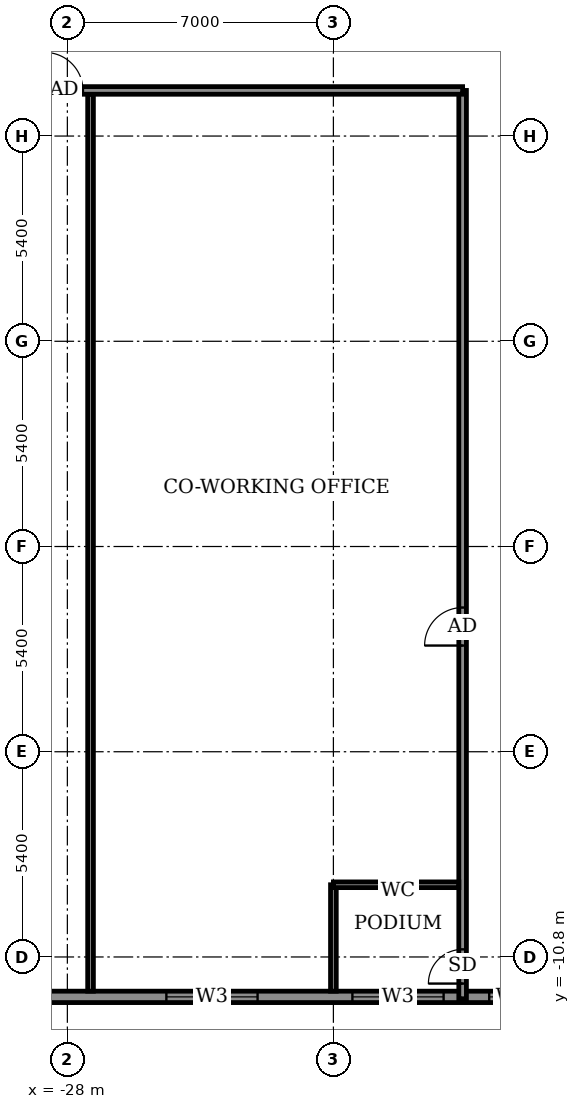
"""IFC4 building model, lengths in metres.
Left out: names, types, materials, properties, quantities, classifications, styles, units other than length and angle.
Written with IfcOpenShell. Run it as: python <this file> out.ifc"""

import sys

from ifc_helpers import new_model, si_unit, direction, frame, frame_2d, origin, place, context, subcontext, project, spatial, rectangle, extrude, element, fill, save


model = new_model("IFC4")
c1 = context("Model", 3, precision=1e-05, world=origin(), true_north=direction((0.0, 1.0)))
c2 = subcontext(c1, "Body", "Model", "MODEL_VIEW")
j1 = project(units=[si_unit("LENGTHUNIT", "METRE"), si_unit("PLANEANGLEUNIT", "RADIAN")], contexts=[c1])
p1 = place(None, origin())
s1 = spatial("IfcSite", under=j1, at=p1, CompositionType="ELEMENT")
p2 = place(p1, origin())
s2 = spatial("IfcBuilding", under=s1, at=p2, CompositionType="ELEMENT")
p3 = place(p2, frame((0.0, 0.0, 6.0)))
s3 = spatial("IfcBuildingStorey", under=s2, at=p3, CompositionType="ELEMENT", Elevation=6.0)
p4 = place(p3, frame((-32.0, -11.85, 0.0), z_axis=(0.0, 0.0, 1.0), x_axis=(1.0, 0.0, 0.0)))
e1 = element("IfcWall", 1, at=p4, inside=s3, PredefinedType="SOLIDWALL", context=c2, shape_type="SweptSolid", body=[
    extrude(rectangle(XDim=17.0, YDim=0.3, at=frame_2d((8.5, 0.0))), origin(), (0.0, 0.0, 1.0), 4.45),
])
p5 = place(p4, frame((1.149, 0.0, 0.9)))
e2 = element("IfcOpeningElement", 2, at=p5, cuts=e1, PredefinedType="OPENING", context=c2, shape_type="SweptSolid", body=[
    extrude(rectangle(XDim=2.4, YDim=1.8, at=frame_2d((1.2, 0.9))), frame((0.0, 0.16, 0.0), z_axis=(0.0, -1.0, 0.0), x_axis=(1.0, 0.0, 0.0)), (0.0, 0.0, 1.0), 0.32),
])
p6 = place(p4, frame((6.605, 0.0, 0.9)))
e3 = element("IfcOpeningElement", 3, at=p6, cuts=e1, PredefinedType="OPENING", context=c2, shape_type="SweptSolid", body=[
    extrude(rectangle(XDim=2.4, YDim=1.8, at=frame_2d((1.2, 0.9))), frame((0.0, 0.16, 0.0), z_axis=(0.0, -1.0, 0.0), x_axis=(1.0, 0.0, 0.0)), (0.0, 0.0, 1.0), 0.32),
])
p7 = place(p4, frame((11.5, 0.0, 0.9)))
e4 = element("IfcOpeningElement", 4, at=p7, cuts=e1, PredefinedType="OPENING", context=c2, shape_type="SweptSolid", body=[
    extrude(rectangle(XDim=2.4, YDim=1.8, at=frame_2d((1.2, 0.9))), frame((0.0, 0.16, 0.0), z_axis=(0.0, -1.0, 0.0), x_axis=(1.0, 0.0, 0.0)), (0.0, 0.0, 1.0), 0.32),
])
p8 = place(p4, frame((15.1, 0.0, 0.9)))
e5 = element("IfcOpeningElement", 5, at=p8, cuts=e1, PredefinedType="OPENING", context=c2, shape_type="SweptSolid", body=[
    extrude(rectangle(XDim=1.2, YDim=1.5, at=frame_2d((0.6, 0.75))), frame((0.0, 0.16, 0.0), z_axis=(0.0, -1.0, 0.0), x_axis=(1.0, 0.0, 0.0)), (0.0, 0.0, 1.0), 0.32),
])
p9 = place(p3, frame((-27.39, -11.7, 0.0), z_axis=(0.0, 0.0, 1.0), x_axis=(0.0, 1.0, 0.0)))
e6 = element("IfcWall", 6, at=p9, inside=s3, PredefinedType="PARTITIONING", context=c2, shape_type="SweptSolid", body=[
    extrude(rectangle(XDim=23.6, YDim=0.15, at=frame_2d((11.8, 0.0))), origin(), (0.0, 0.0, 1.0), 4.45),
])
p10 = place(p3, frame((-21.0, -11.7, 0.0), z_axis=(0.0, 0.0, 1.0), x_axis=(0.0, 1.0, 0.0)))
e7 = element("IfcWall", 7, at=p10, inside=s3, PredefinedType="PARTITIONING", context=c2, shape_type="SweptSolid", body=[
    extrude(rectangle(XDim=2.8, YDim=0.15, at=frame_2d((1.4, 0.0))), origin(), (0.0, 0.0, 1.0), 4.45),
])
p11 = place(p3, frame((-17.6, -11.9, 0.0), z_axis=(0.0, 0.0, 1.0), x_axis=(0.0, 1.0, 0.0)))
e8 = element("IfcWall", 8, at=p11, inside=s3, PredefinedType="PARTITIONING", context=c2, shape_type="SweptSolid", body=[
    extrude(rectangle(XDim=23.9, YDim=0.2, at=frame_2d((11.95, 0.0))), origin(), (0.0, 0.0, 1.0), 4.45),
])
p12 = place(p11, frame((9.294, 0.0, 0.0)))
e9 = element("IfcOpeningElement", 9, at=p12, cuts=e8, PredefinedType="OPENING", context=c2, shape_type="SweptSolid", body=[
    extrude(rectangle(XDim=1.0, YDim=2.1, at=frame_2d((0.5, 1.05))), frame((0.0, 0.11, 0.0), z_axis=(0.0, -1.0, 0.0), x_axis=(1.0, 0.0, 0.0)), (0.0, 0.0, 1.0), 0.22),
])
p13 = place(p11, frame((0.4, 0.0, 0.0)))
e10 = element("IfcOpeningElement", 10, at=p13, cuts=e8, PredefinedType="OPENING", context=c2, shape_type="SweptSolid", body=[
    extrude(rectangle(XDim=0.9, YDim=2.1, at=frame_2d((0.45, 1.05))), frame((0.0, 0.11, 0.0), z_axis=(0.0, -1.0, 0.0), x_axis=(1.0, 0.0, 0.0)), (0.0, 0.0, 1.0), 0.22),
])
p14 = place(p3, frame((-21.0, -8.9, 0.0), z_axis=(0.0, 0.0, 1.0), x_axis=(1.0, 0.0, 0.0)))
e11 = element("IfcWall", 11, at=p14, inside=s3, PredefinedType="PARTITIONING", context=c2, shape_type="SweptSolid", body=[
    extrude(rectangle(XDim=3.3, YDim=0.15, at=frame_2d((1.65, 0.0))), origin(), (0.0, 0.0, 1.0), 4.45),
])
p15 = place(p3, frame((-34.3, 12.0, 0.0), z_axis=(0.0, 0.0, 1.0), x_axis=(1.0, 0.0, 0.0)))
e12 = element("IfcWall", 12, at=p15, inside=s3, PredefinedType="PARTITIONING", context=c2, shape_type="SweptSolid", body=[
    extrude(rectangle(XDim=16.7, YDim=0.2, at=frame_2d((8.35, 0.0))), origin(), (0.0, 0.0, 1.0), 4.45),
])
p16 = place(p15, frame((5.71, 0.0, 0.0)))
e13 = element("IfcOpeningElement", 13, at=p16, cuts=e12, PredefinedType="OPENING", context=c2, shape_type="SweptSolid", body=[
    extrude(rectangle(XDim=1.0, YDim=2.1, at=frame_2d((0.5, 1.05))), frame((0.0, 0.11, 0.0), z_axis=(0.0, -1.0, 0.0), x_axis=(1.0, 0.0, 0.0)), (0.0, 0.0, 1.0), 0.22),
])
p17 = place(p6, origin())
e14 = element("IfcWindow", 14, at=p17, inside=s3, PartitioningType="DOUBLE_PANEL_VERTICAL", PredefinedType="WINDOW", context=c2, shape_type="SweptSolid", body=[
    extrude(rectangle(XDim=2.4, YDim=1.8, at=frame_2d((1.2, 0.9))), frame((0.0, 0.03, 0.0), z_axis=(0.0, -1.0, 0.0), x_axis=(1.0, 0.0, 0.0)), (0.0, 0.0, 1.0), 0.06),
])
fill(e3, e14)
p18 = place(p7, origin())
e15 = element("IfcWindow", 15, at=p18, inside=s3, PartitioningType="DOUBLE_PANEL_VERTICAL", PredefinedType="WINDOW", context=c2, shape_type="SweptSolid", body=[
    extrude(rectangle(XDim=2.4, YDim=1.8, at=frame_2d((1.2, 0.9))), frame((0.0, 0.03, 0.0), z_axis=(0.0, -1.0, 0.0), x_axis=(1.0, 0.0, 0.0)), (0.0, 0.0, 1.0), 0.06),
])
fill(e4, e15)
p19 = place(p8, origin())
e16 = element("IfcWindow", 16, at=p19, inside=s3, PartitioningType="SINGLE_PANEL", PredefinedType="WINDOW", context=c2, shape_type="SweptSolid", body=[
    extrude(rectangle(XDim=1.2, YDim=1.5, at=frame_2d((0.6, 0.75))), frame((0.0, 0.03, 0.0), z_axis=(0.0, -1.0, 0.0), x_axis=(1.0, 0.0, 0.0)), (0.0, 0.0, 1.0), 0.06),
])
fill(e5, e16)
p20 = place(p12, origin())
e17 = element("IfcDoor", 17, at=p20, inside=s3, OperationType="SINGLE_SWING_LEFT", PredefinedType="DOOR", context=c2, shape_type="SweptSolid", body=[
    extrude(rectangle(XDim=1.0, YDim=2.1, at=frame_2d((0.5, 1.05))), frame((0.0, 0.025, 0.0), z_axis=(0.0, -1.0, 0.0), x_axis=(1.0, 0.0, 0.0)), (0.0, 0.0, 1.0), 0.05),
])
fill(e9, e17)
p21 = place(p13, origin())
e18 = element("IfcDoor", 18, at=p21, inside=s3, OperationType="SINGLE_SWING_LEFT", PredefinedType="DOOR", context=c2, shape_type="SweptSolid", body=[
    extrude(rectangle(XDim=0.9, YDim=2.1, at=frame_2d((0.45, 1.05))), frame((0.0, 0.025, 0.0), z_axis=(0.0, -1.0, 0.0), x_axis=(1.0, 0.0, 0.0)), (0.0, 0.0, 1.0), 0.05),
])
fill(e10, e18)
p22 = place(p16, origin())
e19 = element("IfcDoor", 19, at=p22, inside=s3, OperationType="SINGLE_SWING_RIGHT", PredefinedType="DOOR", context=c2, shape_type="SweptSolid", body=[
    extrude(rectangle(XDim=1.0, YDim=2.1, at=frame_2d((0.5, 1.05))), frame((0.0, 0.025, 0.0), z_axis=(0.0, -1.0, 0.0), x_axis=(1.0, 0.0, 0.0)), (0.0, 0.0, 1.0), 0.05),
])
fill(e13, e19)
save(model, sys.argv[1])
